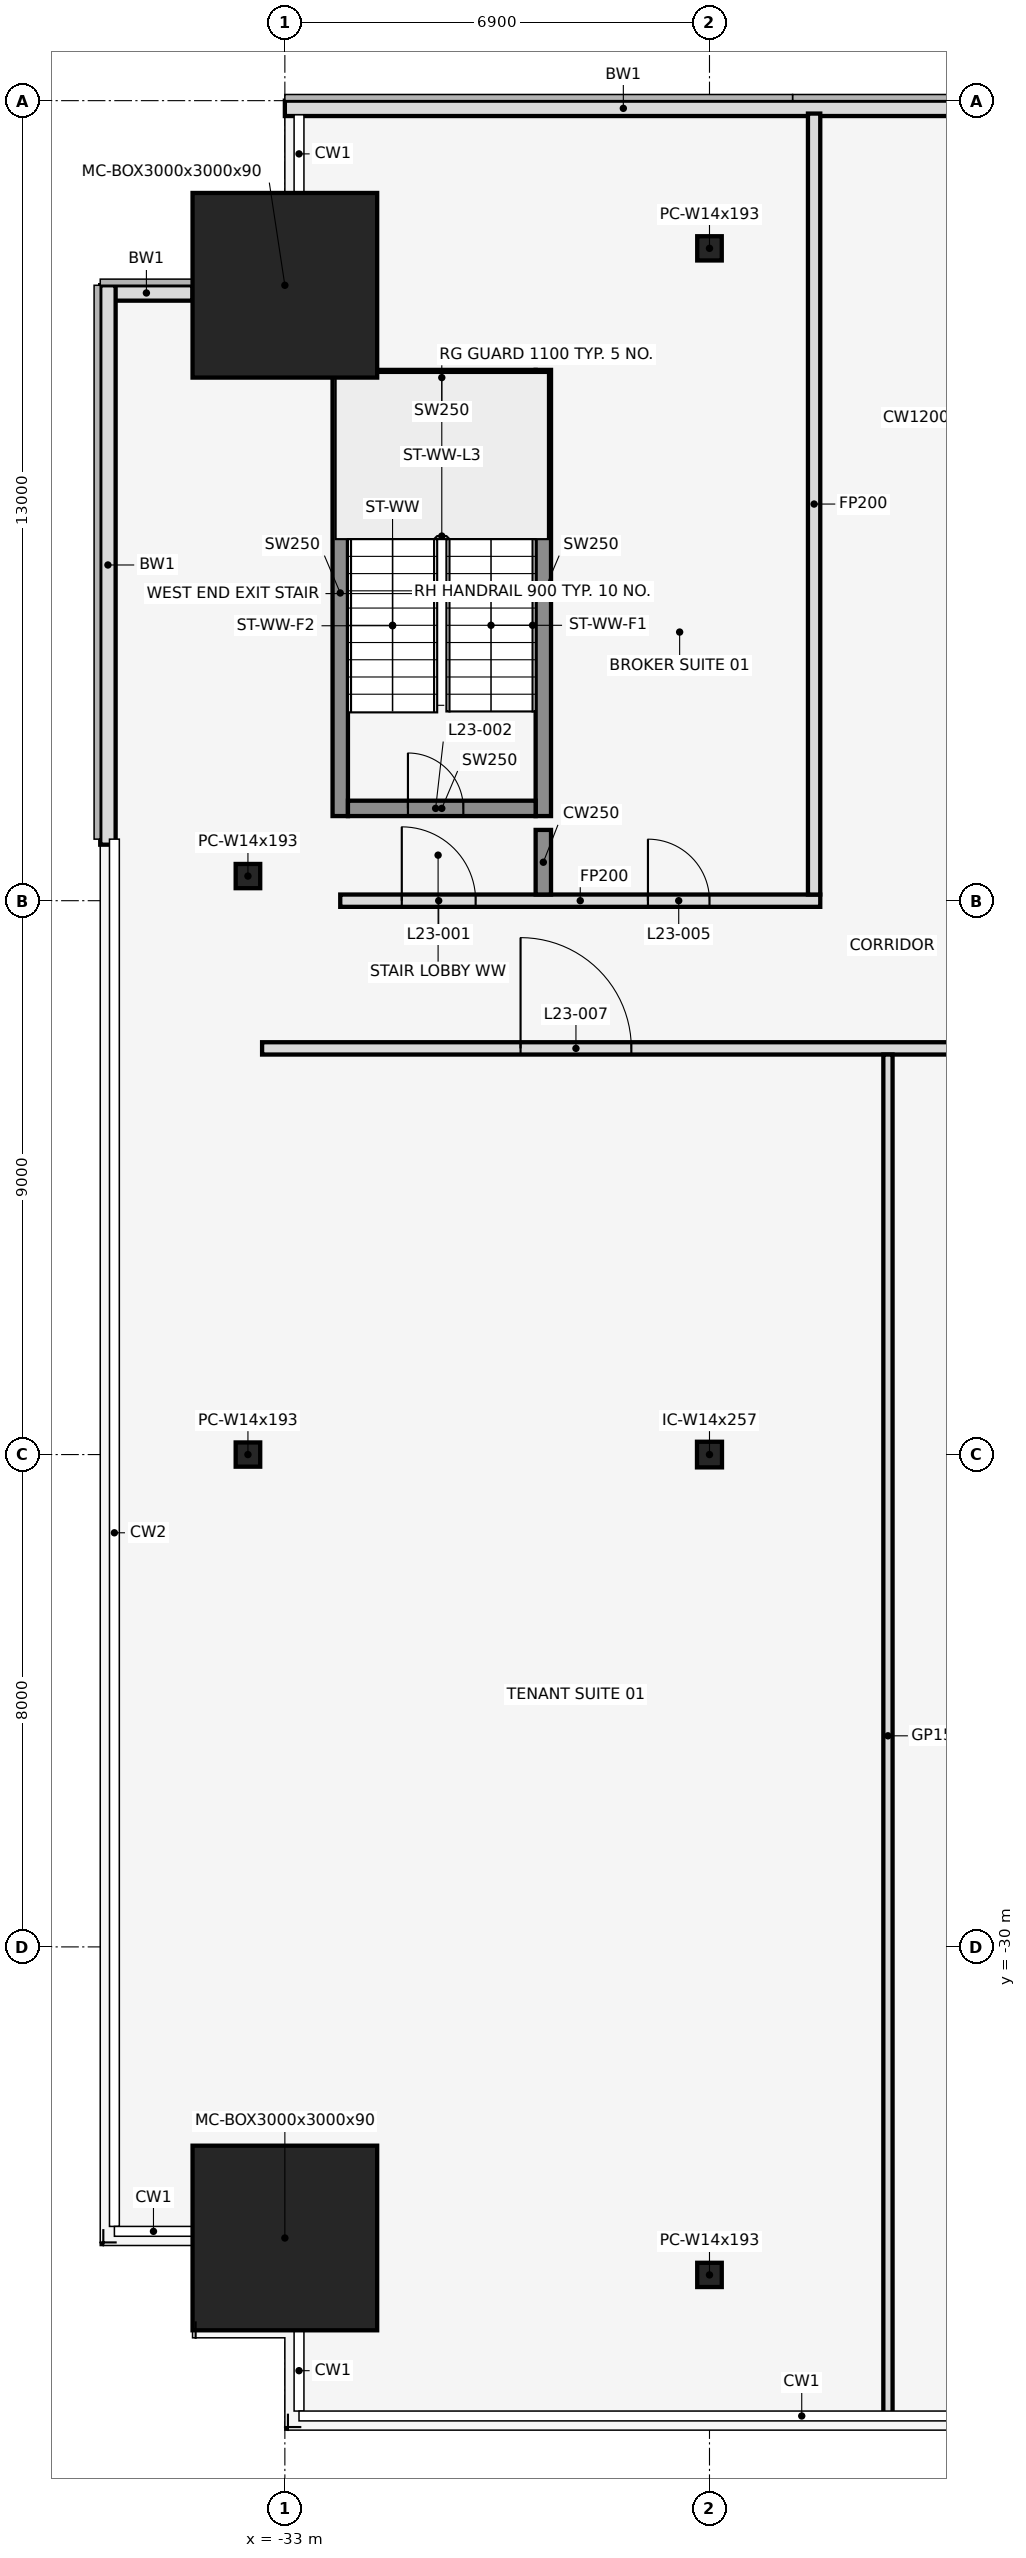
"""IFC4 building model, lengths in metres.
Left out: names, types, materials, properties, quantities, classifications, styles, units other than length and angle.
Written with IfcOpenShell. Run it as: python <this file> out.ifc"""

import sys

from ifc_helpers import new_model, si_unit, direction, frame, frame_2d, origin, origin_2d, place, context, subcontext, project, spatial, rectangle, hollow_rectangle, i_section, extrude, element, fill, save


model = new_model("IFC4")
c1 = context("Model", 3, precision=1e-05, world=origin(), true_north=direction((0.0, 1.0)))
c2 = subcontext(c1, "Body", "Model", "MODEL_VIEW")
j1 = project(units=[si_unit("LENGTHUNIT", "METRE"), si_unit("PLANEANGLEUNIT", "RADIAN")], contexts=[c1])
p1 = place(None, origin())
s1 = spatial("IfcSite", under=j1, at=p1, CompositionType="ELEMENT")
p2 = place(p1, origin())
s2 = spatial("IfcBuilding", under=s1, at=p2, CompositionType="ELEMENT")
p3 = place(p2, frame((0.0, 0.0, 110.4)))
s3 = spatial("IfcBuildingStorey", under=s2, at=p3, CompositionType="ELEMENT", Elevation=110.4)
for number, where, z_axis, x_axis in (
    (1, (-33.0, -34.73, 0.0), (0.0, 0.0, 1.0), (1.0, 0.0, 0.0)),
    (2, (-33.0, -3.0, 0.0), (0.0, 0.0, 1.0), (1.0, 0.0, 0.0)),
):
    element("IfcColumn", number, at=place(p3, frame(where, z_axis=z_axis, x_axis=x_axis)), inside=s3, PredefinedType="COLUMN", context=c2, shape_type="SweptSolid", body=[
        extrude(hollow_rectangle(XDim=3.0, YDim=3.0, WallThickness=0.09, at=origin_2d()), origin(), (0.0, 0.0, 1.0), 4.1),
    ])
for number, where, z_axis, x_axis in (
    (3, (-26.1, -35.33, 0.0), (0.0, 0.0, 1.0), (1.0, 0.0, 0.0)),
    (4, (-26.1, -2.4, 0.0), (0.0, 0.0, 1.0), (1.0, 0.0, 0.0)),
    (5, (-33.6, -12.6, 0.0), (0.0, 0.0, 1.0), (1.0, 0.0, 0.0)),
    (6, (-33.6, -22.0, 0.0), (0.0, 0.0, 1.0), (1.0, 0.0, 0.0)),
):
    element("IfcColumn", number, at=place(p3, frame(where, z_axis=z_axis, x_axis=x_axis)), inside=s3, PredefinedType="COLUMN", context=c2, shape_type="SweptSolid", body=[
        extrude(i_section(OverallWidth=0.399, OverallDepth=0.394, WebThickness=0.023, FlangeThickness=0.037, at=origin_2d()), origin(), (0.0, 0.0, 1.0), 4.1),
    ])
p4 = place(p3, frame((-26.1, -22.0, 0.0), z_axis=(0.0, 0.0, 1.0), x_axis=(1.0, 0.0, 0.0)))
e7 = element("IfcColumn", 7, at=p4, inside=s3, PredefinedType="COLUMN", context=c2, shape_type="SweptSolid", body=[
    extrude(i_section(OverallWidth=0.406, OverallDepth=0.417, WebThickness=0.03, FlangeThickness=0.048, at=origin_2d()), origin(), (0.0, 0.0, 1.0), 4.1),
])
p5 = place(p3, frame((-22.0, -0.125, 0.0), z_axis=(0.0, 0.0, 1.0), x_axis=(-1.0, 0.0, 0.0)))
e8 = element("IfcWall", 8, at=p5, inside=s3, PredefinedType="STANDARD", context=c2, shape_type="SweptSolid", body=[
    extrude(rectangle(XDim=11.0, YDim=0.25, at=frame_2d((5.5, 0.0))), origin(), (0.0, 0.0, 1.0), 3.95),
])
p6 = place(p3, frame((-34.5, -3.125, 0.0), z_axis=(0.0, 0.0, 1.0), x_axis=(-1.0, 0.0, 0.0)))
e9 = element("IfcWall", 9, at=p6, inside=s3, PredefinedType="STANDARD", context=c2, shape_type="SweptSolid", body=[
    extrude(rectangle(XDim=1.5, YDim=0.25, at=frame_2d((0.75, 0.0))), origin(), (0.0, 0.0, 1.0), 3.95),
])
p7 = place(p3, frame((-35.875, -3.0, 0.0), z_axis=(0.0, 0.0, 1.0), x_axis=(0.0, -1.0, 0.0)))
e10 = element("IfcWall", 10, at=p7, inside=s3, PredefinedType="STANDARD", context=c2, shape_type="SweptSolid", body=[
    extrude(rectangle(XDim=9.09, YDim=0.25, at=frame_2d((4.545, 0.0))), origin(), (0.0, 0.0, 1.0), 3.95),
])
for number, where, z_axis, x_axis in (
    (11, (-32.1, -11.625, 0.0), (0.0, 0.0, 1.0), (0.0, 1.0, 0.0)),
    (12, (-28.8, -11.625, 0.0), (0.0, 0.0, 1.0), (0.0, 1.0, 0.0)),
):
    element("IfcWall", number, at=place(p3, frame(where, z_axis=z_axis, x_axis=x_axis)), inside=s3, PredefinedType="SHEAR", context=c2, shape_type="SweptSolid", body=[
        extrude(rectangle(XDim=7.25, YDim=0.25, at=frame_2d((3.625, 0.0))), origin(), (0.0, 0.0, 1.0), 4.1),
    ])
p8 = place(p3, frame((-31.975, -11.5, 0.0), z_axis=(0.0, 0.0, 1.0), x_axis=(1.0, 0.0, 0.0)))
e13 = element("IfcWall", 13, at=p8, inside=s3, PredefinedType="SHEAR", context=c2, shape_type="SweptSolid", body=[
    extrude(rectangle(XDim=3.05, YDim=0.25, at=frame_2d((1.525, 0.0))), origin(), (0.0, 0.0, 1.0), 4.1),
])
p9 = place(p8, frame((0.975, 0.0, 0.0)))
e14 = element("IfcOpeningElement", 14, at=p9, cuts=e13, PredefinedType="OPENING", context=c2, shape_type="SweptSolid", body=[
    extrude(rectangle(XDim=0.9, YDim=2.1, at=frame_2d((0.45, 1.05))), frame((0.0, 0.137, 0.0), z_axis=(0.0, -1.0, 0.0), x_axis=(1.0, 0.0, 0.0)), (0.0, 0.0, 1.0), 0.274),
])
p10 = place(p3, frame((-31.975, -4.5, 0.0), z_axis=(0.0, 0.0, 1.0), x_axis=(1.0, 0.0, 0.0)))
e15 = element("IfcWall", 15, at=p10, inside=s3, PredefinedType="SHEAR", context=c2, shape_type="SweptSolid", body=[
    extrude(rectangle(XDim=3.05, YDim=0.25, at=frame_2d((1.525, 0.0))), origin(), (0.0, 0.0, 1.0), 4.1),
])
p11 = place(p3, frame((-33.37, -15.4, 0.0), z_axis=(0.0, 0.0, 1.0), x_axis=(1.0, 0.0, 0.0)))
e16 = element("IfcWall", 16, at=p11, inside=s3, PredefinedType="PARTITIONING", context=c2, shape_type="SweptSolid", body=[
    extrude(rectangle(XDim=66.74, YDim=0.2, at=frame_2d((33.37, 0.0))), origin(), (0.0, 0.0, 1.0), 3.018),
])
p12 = place(p11, frame((4.2, 0.0, 0.0)))
e17 = element("IfcOpeningElement", 17, at=p12, cuts=e16, PredefinedType="OPENING", context=c2, shape_type="SweptSolid", body=[
    extrude(rectangle(XDim=1.8, YDim=2.1, at=frame_2d((0.9, 1.05))), frame((0.0, 0.112, 0.0), z_axis=(0.0, -1.0, 0.0), x_axis=(1.0, 0.0, 0.0)), (0.0, 0.0, 1.0), 0.224),
])
p13 = place(p11, frame((15.47, 0.0, 0.0)))
e18 = element("IfcOpeningElement", 18, at=p13, cuts=e16, PredefinedType="OPENING", context=c2, shape_type="SweptSolid", body=[
    extrude(rectangle(XDim=1.0, YDim=2.1, at=frame_2d((0.5, 1.05))), frame((0.0, 0.112, 0.0), z_axis=(0.0, -1.0, 0.0), x_axis=(1.0, 0.0, 0.0)), (0.0, 0.0, 1.0), 0.224),
])
p14 = place(p11, frame((27.07, 0.0, 0.0)))
e19 = element("IfcOpeningElement", 19, at=p14, cuts=e16, PredefinedType="OPENING", context=c2, shape_type="SweptSolid", body=[
    extrude(rectangle(XDim=1.0, YDim=2.1, at=frame_2d((0.5, 1.05))), frame((0.0, 0.112, 0.0), z_axis=(0.0, -1.0, 0.0), x_axis=(1.0, 0.0, 0.0)), (0.0, 0.0, 1.0), 0.224),
])
p15 = place(p11, frame((39.67, 0.0, 0.0)))
e20 = element("IfcOpeningElement", 20, at=p15, cuts=e16, PredefinedType="OPENING", context=c2, shape_type="SweptSolid", body=[
    extrude(rectangle(XDim=1.8, YDim=2.1, at=frame_2d((0.9, 1.05))), frame((0.0, 0.112, 0.0), z_axis=(0.0, -1.0, 0.0), x_axis=(1.0, 0.0, 0.0)), (0.0, 0.0, 1.0), 0.224),
])
p16 = place(p11, frame((48.77, 0.0, 0.0)))
e21 = element("IfcOpeningElement", 21, at=p16, cuts=e16, PredefinedType="OPENING", context=c2, shape_type="SweptSolid", body=[
    extrude(rectangle(XDim=1.0, YDim=2.1, at=frame_2d((0.5, 1.05))), frame((0.0, 0.112, 0.0), z_axis=(0.0, -1.0, 0.0), x_axis=(1.0, 0.0, 0.0)), (0.0, 0.0, 1.0), 0.224),
])
p17 = place(p11, frame((54.67, 0.0, 0.0)))
e22 = element("IfcOpeningElement", 22, at=p17, cuts=e16, PredefinedType="OPENING", context=c2, shape_type="SweptSolid", body=[
    extrude(rectangle(XDim=0.9, YDim=2.1, at=frame_2d((0.45, 1.05))), frame((0.0, 0.112, 0.0), z_axis=(0.0, -1.0, 0.0), x_axis=(1.0, 0.0, 0.0)), (0.0, 0.0, 1.0), 0.224),
])
p18 = place(p11, frame((62.57, 0.0, 0.0)))
e23 = element("IfcOpeningElement", 23, at=p18, cuts=e16, PredefinedType="OPENING", context=c2, shape_type="SweptSolid", body=[
    extrude(rectangle(XDim=1.0, YDim=2.1, at=frame_2d((0.5, 1.05))), frame((0.0, 0.112, 0.0), z_axis=(0.0, -1.0, 0.0), x_axis=(1.0, 0.0, 0.0)), (0.0, 0.0, 1.0), 0.224),
])
p19 = place(p3, frame((-32.1, -13.0, 0.0), z_axis=(0.0, 0.0, 1.0), x_axis=(1.0, 0.0, 0.0)))
e24 = element("IfcWall", 24, at=p19, inside=s3, PredefinedType="PARTITIONING", context=c2, shape_type="SweptSolid", body=[
    extrude(rectangle(XDim=7.8, YDim=0.2, at=frame_2d((3.9, 0.0))), origin(), (0.0, 0.0, 1.0), 3.018),
])
p20 = place(p19, frame((1.0, 0.0, 0.0)))
e25 = element("IfcOpeningElement", 25, at=p20, cuts=e24, PredefinedType="OPENING", context=c2, shape_type="SweptSolid", body=[
    extrude(rectangle(XDim=1.2, YDim=2.1, at=frame_2d((0.6, 1.05))), frame((0.0, 0.112, 0.0), z_axis=(0.0, -1.0, 0.0), x_axis=(1.0, 0.0, 0.0)), (0.0, 0.0, 1.0), 0.224),
])
p21 = place(p19, frame((5.0, 0.0, 0.0)))
e26 = element("IfcOpeningElement", 26, at=p21, cuts=e24, PredefinedType="OPENING", context=c2, shape_type="SweptSolid", body=[
    extrude(rectangle(XDim=1.0, YDim=2.1, at=frame_2d((0.5, 1.05))), frame((0.0, 0.112, 0.0), z_axis=(0.0, -1.0, 0.0), x_axis=(1.0, 0.0, 0.0)), (0.0, 0.0, 1.0), 0.224),
])
p22 = place(p3, frame((-28.8, -12.9, 0.0), z_axis=(0.0, 0.0, 1.0), x_axis=(0.0, 1.0, 0.0)))
e27 = element("IfcWall", 27, at=p22, inside=s3, PredefinedType="SHEAR", context=c2, shape_type="SweptSolid", body=[
    extrude(rectangle(XDim=1.05, YDim=0.25, at=frame_2d((0.525, 0.0))), origin(), (0.0, 0.0, 1.0), 4.1),
])
p23 = place(p3, frame((-24.4, -12.9, 0.0), z_axis=(0.0, 0.0, 1.0), x_axis=(0.0, 1.0, 0.0)))
e28 = element("IfcWall", 28, at=p23, inside=s3, PredefinedType="PARTITIONING", context=c2, shape_type="SweptSolid", body=[
    extrude(rectangle(XDim=12.69, YDim=0.2, at=frame_2d((6.345, 0.0))), origin(), (0.0, 0.0, 1.0), 3.018),
])
p24 = place(p3, frame((-23.2, -37.64, 0.0), z_axis=(0.0, 0.0, 1.0), x_axis=(0.0, 1.0, 0.0)))
e29 = element("IfcWall", 29, at=p24, inside=s3, PredefinedType="PARTITIONING", context=c2, shape_type="SweptSolid", body=[
    extrude(rectangle(XDim=22.14, YDim=0.15, at=frame_2d((11.07, 0.0))), origin(), (0.0, 0.0, 1.0), 3.018),
])
p25 = place(p20, origin())
e30 = element("IfcDoor", 30, at=p25, inside=s3, OperationType="SINGLE_SWING_LEFT", PredefinedType="DOOR", context=c2, shape_type="SweptSolid", body=[
    extrude(rectangle(XDim=1.2, YDim=2.1, at=frame_2d((0.6, 1.05))), frame((0.0, 0.025, 0.0), z_axis=(0.0, -1.0, 0.0), x_axis=(1.0, 0.0, 0.0)), (0.0, 0.0, 1.0), 0.05),
])
fill(e25, e30)
p26 = place(p9, origin())
e31 = element("IfcDoor", 31, at=p26, inside=s3, OperationType="SINGLE_SWING_LEFT", PredefinedType="DOOR", context=c2, shape_type="SweptSolid", body=[
    extrude(rectangle(XDim=0.9, YDim=2.1, at=frame_2d((0.45, 1.05))), frame((0.0, 0.025, 0.0), z_axis=(0.0, -1.0, 0.0), x_axis=(1.0, 0.0, 0.0)), (0.0, 0.0, 1.0), 0.05),
])
fill(e14, e31)
p27 = place(p21, origin())
e32 = element("IfcDoor", 32, at=p27, inside=s3, OperationType="SINGLE_SWING_LEFT", PredefinedType="DOOR", context=c2, shape_type="SweptSolid", body=[
    extrude(rectangle(XDim=1.0, YDim=2.1, at=frame_2d((0.5, 1.05))), frame((0.0, 0.025, 0.0), z_axis=(0.0, -1.0, 0.0), x_axis=(1.0, 0.0, 0.0)), (0.0, 0.0, 1.0), 0.05),
])
fill(e26, e32)
p28 = place(p12, origin())
e33 = element("IfcDoor", 33, at=p28, inside=s3, OperationType="SINGLE_SWING_LEFT", PredefinedType="DOOR", context=c2, shape_type="SweptSolid", body=[
    extrude(rectangle(XDim=1.8, YDim=2.1, at=frame_2d((0.9, 1.05))), frame((0.0, 0.025, 0.0), z_axis=(0.0, -1.0, 0.0), x_axis=(1.0, 0.0, 0.0)), (0.0, 0.0, 1.0), 0.05),
])
fill(e17, e33)
save(model, sys.argv[1])
